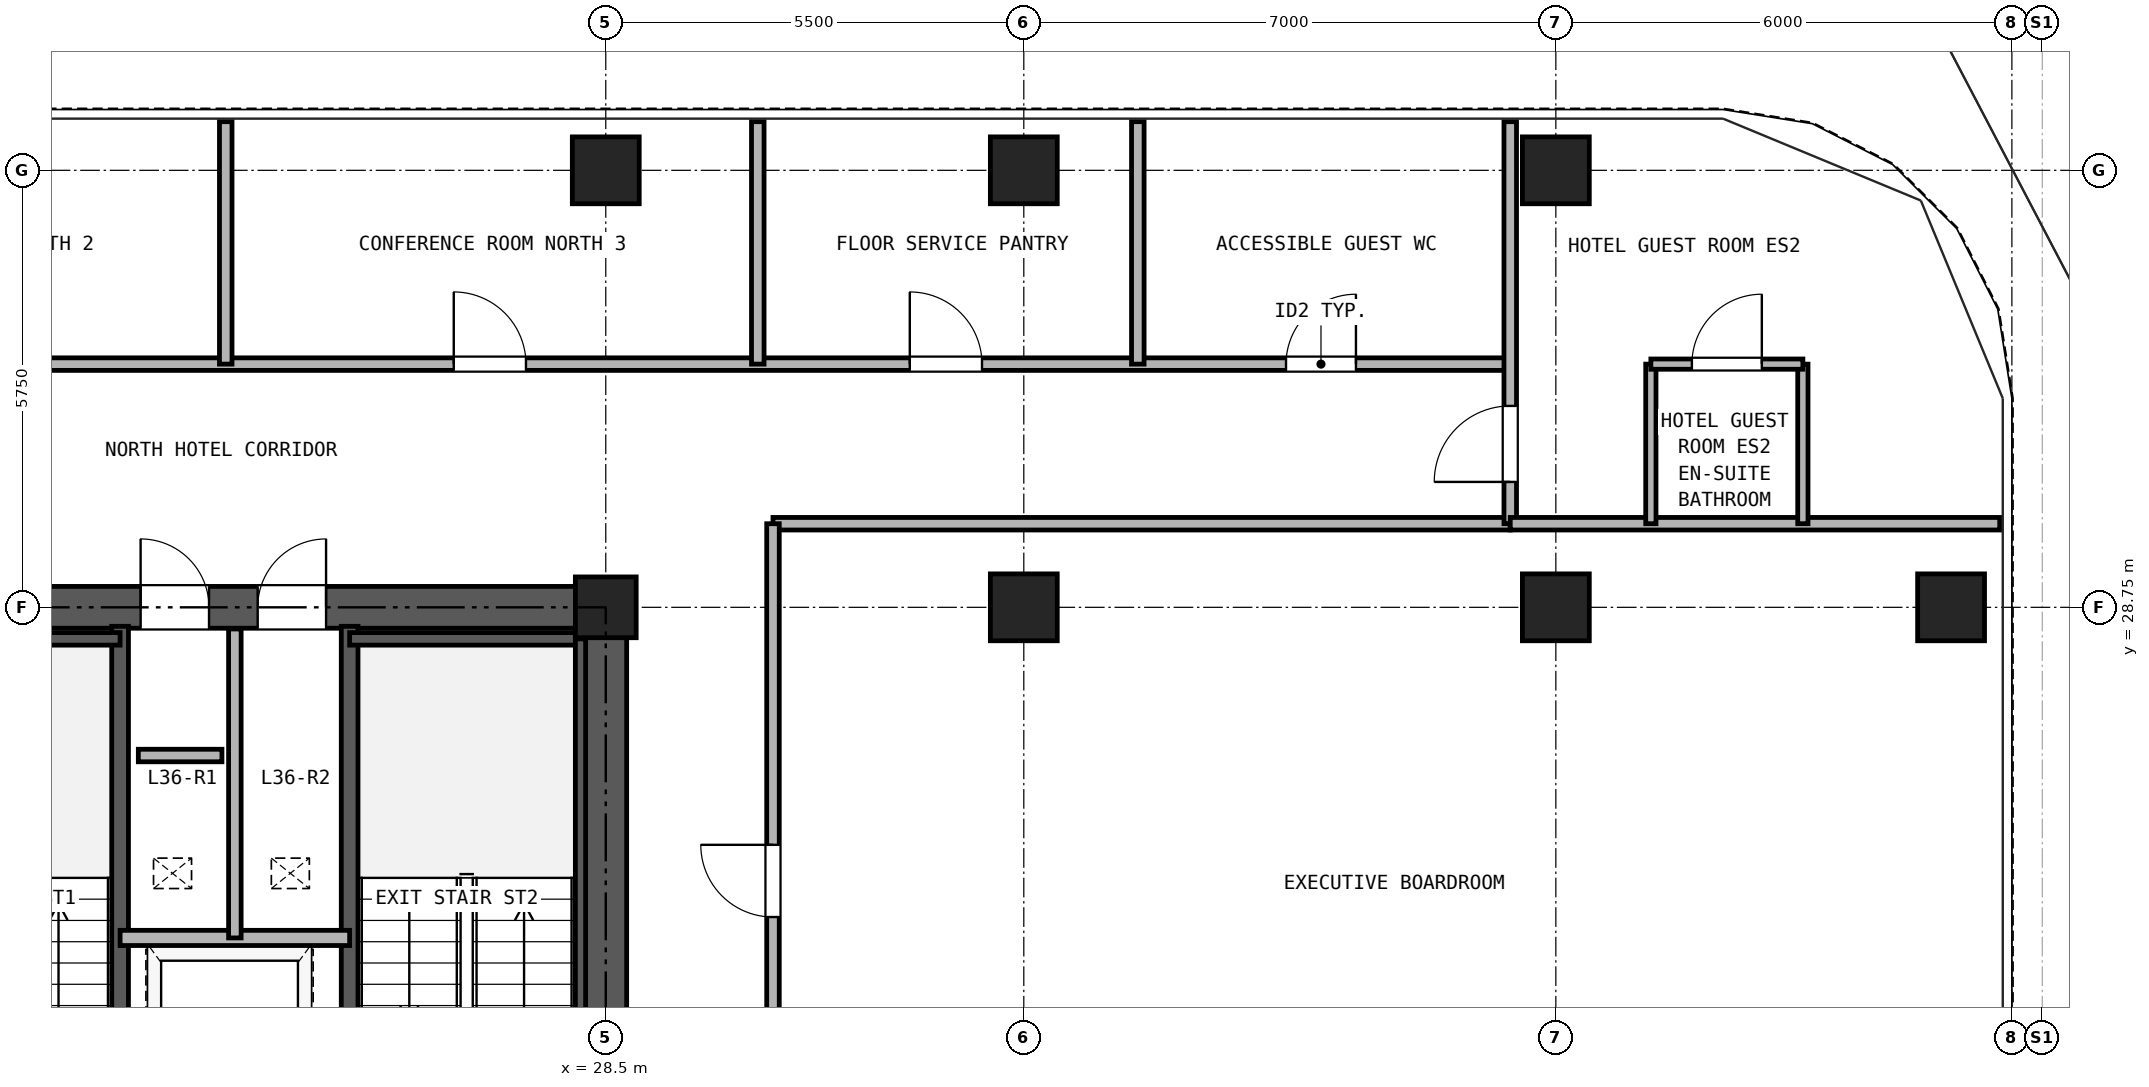
"""IFC4 building model, lengths in metres.
Left out: names, types, materials, properties, quantities, classifications, styles, units other than length and angle.
Written with IfcOpenShell. Run it as: python <this file> out.ifc"""

import sys

from ifc_helpers import new_model, si_unit, direction, frame, frame_2d, origin, origin_2d, place, context, subcontext, project, spatial, rectangle, hollow_rectangle, extrude, source, transform, mapped, element, fill, save


model = new_model("IFC4")
c1 = context("Model", 3, precision=1e-05, world=origin(), true_north=direction((0.0, 1.0)))
c2 = subcontext(c1, "Body", "Model", "MODEL_VIEW")
j1 = project(units=[si_unit("LENGTHUNIT", "METRE"), si_unit("PLANEANGLEUNIT", "RADIAN")], contexts=[c1])
p1 = place(None, origin())
s1 = spatial("IfcSite", under=j1, at=p1, CompositionType="ELEMENT")
p2 = place(p1, origin())
s2 = spatial("IfcBuilding", under=s1, at=p2, CompositionType="ELEMENT")
p3 = place(p2, frame((0.0, 0.0, 131.1)))
s3 = spatial("IfcBuildingStorey", under=s2, at=p3, CompositionType="ELEMENT", Elevation=131.1)
m1 = source(origin(), c2, "Body", "SweptSolid", [
    extrude(hollow_rectangle(XDim=0.88, YDim=0.88, WallThickness=0.05, at=origin_2d()), origin(), (0.0, 0.0, 1.0), 2.95),
])
for number, where, z_axis, x_axis in (
    (1, (28.5, 34.5, 0.0), (0.0, 0.0, 1.0), (1.0, 0.0, 0.0)),
    (2, (34.0, 34.5, 0.0), (0.0, 0.0, 1.0), (1.0, 0.0, 0.0)),
    (3, (41.0, 34.5, 0.0), (0.0, 0.0, 1.0), (1.0, 0.0, 0.0)),
    (4, (46.2, 28.75, 0.0), (0.0, 0.0, 1.0), (1.0, 0.0, 0.0)),
):
    element("IfcColumn", number, at=place(p3, frame(where, z_axis=z_axis, x_axis=x_axis)), inside=s3, PredefinedType="COLUMN", context=c2, shape_type="MappedRepresentation", body=[
        mapped(m1, transform((0.0, 0.0, 0.0), x_axis=(1.0, 0.0, 0.0), y_axis=(0.0, 1.0, 0.0), z_axis=(0.0, 0.0, 1.0), scale=1.0)),
    ])
m2 = source(origin(), c2, "Body", "SweptSolid", [
    extrude(hollow_rectangle(XDim=0.8, YDim=0.8, WallThickness=0.045, at=origin_2d()), origin(), (0.0, 0.0, 1.0), 2.95),
])
p4 = place(p3, frame((28.5, 28.75, 0.0), z_axis=(0.0, 0.0, 1.0), x_axis=(1.0, 0.0, 0.0)))
e5 = element("IfcColumn", 5, at=p4, inside=s3, PredefinedType="COLUMN", context=c2, shape_type="MappedRepresentation", body=[
    mapped(m2, transform((0.0, 0.0, 0.0), x_axis=(1.0, 0.0, 0.0), y_axis=(0.0, 1.0, 0.0), z_axis=(0.0, 0.0, 1.0), scale=1.0)),
])
for number, where, z_axis, x_axis in (
    (6, (34.0, 28.75, 0.0), (0.0, 0.0, 1.0), (1.0, 0.0, 0.0)),
    (7, (41.0, 28.75, 0.0), (0.0, 0.0, 1.0), (1.0, 0.0, 0.0)),
):
    element("IfcColumn", number, at=place(p3, frame(where, z_axis=z_axis, x_axis=x_axis)), inside=s3, PredefinedType="COLUMN", context=c2, shape_type="MappedRepresentation", body=[
        mapped(m1, transform((0.0, 0.0, 0.0), x_axis=(1.0, 0.0, 0.0), y_axis=(0.0, 1.0, 0.0), z_axis=(0.0, 0.0, 1.0), scale=1.0)),
    ])
p5 = place(p3, frame((18.225, 28.75, 0.0), z_axis=(0.0, 0.0, 1.0), x_axis=(1.0, 0.0, 0.0)))
e8 = element("IfcWall", 8, at=p5, inside=s3, PredefinedType="SHEAR", context=c2, shape_type="SweptSolid", body=[
    extrude(rectangle(XDim=10.55, YDim=0.55, at=frame_2d((5.275, 0.0))), origin(), (0.0, 0.0, 1.0), 2.95),
])
p6 = place(p5, frame((4.155, 0.0, 0.0)))
e9 = element("IfcOpeningElement", 9, at=p6, cuts=e8, PredefinedType="OPENING", context=c2, shape_type="SweptSolid", body=[
    extrude(rectangle(XDim=0.9, YDim=2.05, at=frame_2d((0.45, 1.025))), frame((0.0, 0.285, 0.0), z_axis=(0.0, -1.0, 0.0), x_axis=(1.0, 0.0, 0.0)), (0.0, 0.0, 1.0), 0.57),
])
p7 = place(p5, frame((5.695, 0.0, 0.0)))
e10 = element("IfcOpeningElement", 10, at=p7, cuts=e8, PredefinedType="OPENING", context=c2, shape_type="SweptSolid", body=[
    extrude(rectangle(XDim=0.9, YDim=2.05, at=frame_2d((0.45, 1.025))), frame((0.0, 0.285, 0.0), z_axis=(0.0, -1.0, 0.0), x_axis=(1.0, 0.0, 0.0)), (0.0, 0.0, 1.0), 0.57),
])
p8 = place(p3, frame((28.5, 11.775, 0.0), z_axis=(0.0, 0.0, 1.0), x_axis=(0.0, 1.0, 0.0)))
e11 = element("IfcWall", 11, at=p8, inside=s3, PredefinedType="SHEAR", context=c2, shape_type="SweptSolid", body=[
    extrude(rectangle(XDim=16.7, YDim=0.55, at=frame_2d((8.35, 0.0))), origin(), (0.0, 0.0, 1.0), 2.95),
])
p9 = place(p8, frame((7.375, 0.0, 0.0)))
e12 = element("IfcOpeningElement", 12, at=p9, cuts=e11, PredefinedType="OPENING", context=c2, shape_type="SweptSolid", body=[
    extrude(rectangle(XDim=1.15, YDim=2.2, at=frame_2d((0.575, 1.1))), frame((0.0, 0.285, 0.0), z_axis=(0.0, -1.0, 0.0), x_axis=(1.0, 0.0, 0.0)), (0.0, 0.0, 1.0), 0.57),
])
for number, where, z_axis, x_axis in (
    (13, (22.11, 21.39, 0.0), (0.0, 0.0, 1.0), (0.0, 1.0, 0.0)),
    (14, (25.13, 21.39, 0.0), (0.0, 0.0, 1.0), (0.0, 1.0, 0.0)),
):
    element("IfcWall", number, at=place(p3, frame(where, z_axis=z_axis, x_axis=x_axis)), inside=s3, PredefinedType="SOLIDWALL", context=c2, shape_type="SweptSolid", body=[
        extrude(rectangle(XDim=7.11, YDim=0.22, at=frame_2d((3.555, 0.0))), origin(), (0.0, 0.0, 1.0), 2.95),
    ])
p10 = place(p3, frame((18.785, 28.335, 0.0), z_axis=(0.0, 0.0, 1.0), x_axis=(1.0, 0.0, 0.0)))
e15 = element("IfcWall", 15, at=p10, inside=s3, PredefinedType="PARTITIONING", context=c2, shape_type="SweptSolid", body=[
    extrude(rectangle(XDim=3.325, YDim=0.165, at=frame_2d((1.663, 0.0))), origin(), (0.0, 0.0, 1.0), 2.95),
])
p11 = place(p3, frame((25.13, 28.335, 0.0), z_axis=(0.0, 0.0, 1.0), x_axis=(1.0, 0.0, 0.0)))
e16 = element("IfcWall", 16, at=p11, inside=s3, PredefinedType="PARTITIONING", context=c2, shape_type="SweptSolid", body=[
    extrude(rectangle(XDim=3.085, YDim=0.165, at=frame_2d((1.542, 0.0))), origin(), (0.0, 0.0, 1.0), 2.95),
])
p12 = place(p3, frame((28.167, 21.39, 0.0), z_axis=(0.0, 0.0, 1.0), x_axis=(0.0, 1.0, 0.0)))
e17 = element("IfcWall", 17, at=p12, inside=s3, PredefinedType="PARTITIONING", context=c2, shape_type="SweptSolid", body=[
    extrude(rectangle(XDim=6.945, YDim=0.135, at=frame_2d((3.473, 0.0))), origin(), (0.0, 0.0, 1.0), 2.95),
])
p13 = place(p3, frame((22.11, 24.4, 0.0), z_axis=(0.0, 0.0, 1.0), x_axis=(1.0, 0.0, 0.0)))
e18 = element("IfcWall", 18, at=p13, inside=s3, PredefinedType="PARTITIONING", context=c2, shape_type="SweptSolid", body=[
    extrude(rectangle(XDim=3.02, YDim=0.2, at=frame_2d((1.51, 0.0))), origin(), (0.0, 0.0, 1.0), 2.95),
])
p14 = place(p3, frame((23.62, 24.4, 0.0), z_axis=(0.0, 0.0, 1.0), x_axis=(0.0, 1.0, 0.0)))
e19 = element("IfcWall", 19, at=p14, inside=s3, PredefinedType="PARTITIONING", context=c2, shape_type="SweptSolid", body=[
    extrude(rectangle(XDim=4.065, YDim=0.165, at=frame_2d((2.033, 0.0))), origin(), (0.0, 0.0, 1.0), 2.95),
])
p15 = place(p3, frame((6.6, 31.95, 0.0), z_axis=(0.0, 0.0, 1.0), x_axis=(1.0, 0.0, 0.0)))
e20 = element("IfcWall", 20, at=p15, inside=s3, PredefinedType="PARTITIONING", context=c2, shape_type="SweptSolid", body=[
    extrude(rectangle(XDim=33.8, YDim=0.165, at=frame_2d((16.9, 0.0))), origin(), (0.0, 0.0, 1.0), 2.95),
])
p16 = place(p15, frame((4.45, 0.0, 0.0)))
e21 = element("IfcOpeningElement", 21, at=p16, cuts=e20, PredefinedType="OPENING", context=c2, shape_type="SweptSolid", body=[
    extrude(rectangle(XDim=0.95, YDim=2.15, at=frame_2d((0.475, 1.075))), frame((0.0, 0.093, 0.0), z_axis=(0.0, -1.0, 0.0), x_axis=(1.0, 0.0, 0.0)), (0.0, 0.0, 1.0), 0.185),
])
p17 = place(p15, frame((12.9, 0.0, 0.0)))
e22 = element("IfcOpeningElement", 22, at=p17, cuts=e20, PredefinedType="OPENING", context=c2, shape_type="SweptSolid", body=[
    extrude(rectangle(XDim=0.95, YDim=2.15, at=frame_2d((0.475, 1.075))), frame((0.0, 0.093, 0.0), z_axis=(0.0, -1.0, 0.0), x_axis=(1.0, 0.0, 0.0)), (0.0, 0.0, 1.0), 0.185),
])
p18 = place(p15, frame((19.9, 0.0, 0.0)))
e23 = element("IfcOpeningElement", 23, at=p18, cuts=e20, PredefinedType="OPENING", context=c2, shape_type="SweptSolid", body=[
    extrude(rectangle(XDim=0.95, YDim=2.15, at=frame_2d((0.475, 1.075))), frame((0.0, 0.093, 0.0), z_axis=(0.0, -1.0, 0.0), x_axis=(1.0, 0.0, 0.0)), (0.0, 0.0, 1.0), 0.185),
])
p19 = place(p15, frame((25.9, 0.0, 0.0)))
e24 = element("IfcOpeningElement", 24, at=p19, cuts=e20, PredefinedType="OPENING", context=c2, shape_type="SweptSolid", body=[
    extrude(rectangle(XDim=0.95, YDim=2.15, at=frame_2d((0.475, 1.075))), frame((0.0, 0.093, 0.0), z_axis=(0.0, -1.0, 0.0), x_axis=(1.0, 0.0, 0.0)), (0.0, 0.0, 1.0), 0.185),
])
p20 = place(p15, frame((30.85, 0.0, 0.0)))
e25 = element("IfcOpeningElement", 25, at=p20, cuts=e20, PredefinedType="OPENING", context=c2, shape_type="SweptSolid", body=[
    extrude(rectangle(XDim=0.92, YDim=2.1, at=frame_2d((0.46, 1.05))), frame((0.0, 0.093, 0.0), z_axis=(0.0, -1.0, 0.0), x_axis=(1.0, 0.0, 0.0)), (0.0, 0.0, 1.0), 0.185),
])
p21 = place(p3, frame((30.7, 29.85, 0.0), z_axis=(0.0, 0.0, 1.0), x_axis=(1.0, 0.0, 0.0)))
e26 = element("IfcWall", 26, at=p21, inside=s3, PredefinedType="PARTITIONING", context=c2, shape_type="SweptSolid", body=[
    extrude(rectangle(XDim=9.7, YDim=0.165, at=frame_2d((4.85, 0.0))), origin(), (0.0, 0.0, 1.0), 2.95),
])
p22 = place(p3, frame((30.7, 11.15, 0.0), z_axis=(0.0, 0.0, 1.0), x_axis=(0.0, 1.0, 0.0)))
e27 = element("IfcWall", 27, at=p22, inside=s3, PredefinedType="PARTITIONING", context=c2, shape_type="SweptSolid", body=[
    extrude(rectangle(XDim=18.7, YDim=0.165, at=frame_2d((9.35, 0.0))), origin(), (0.0, 0.0, 1.0), 2.95),
])
p23 = place(p22, frame((4.175, 0.0, 0.0)))
e28 = element("IfcOpeningElement", 28, at=p23, cuts=e27, PredefinedType="OPENING", context=c2, shape_type="SweptSolid", body=[
    extrude(rectangle(XDim=0.95, YDim=2.15, at=frame_2d((0.475, 1.075))), frame((0.0, 0.093, 0.0), z_axis=(0.0, -1.0, 0.0), x_axis=(1.0, 0.0, 0.0)), (0.0, 0.0, 1.0), 0.185),
])
p24 = place(p22, frame((13.525, 0.0, 0.0)))
e29 = element("IfcOpeningElement", 29, at=p24, cuts=e27, PredefinedType="OPENING", context=c2, shape_type="SweptSolid", body=[
    extrude(rectangle(XDim=0.95, YDim=2.15, at=frame_2d((0.475, 1.075))), frame((0.0, 0.093, 0.0), z_axis=(0.0, -1.0, 0.0), x_axis=(1.0, 0.0, 0.0)), (0.0, 0.0, 1.0), 0.185),
])
p25 = place(p3, frame((40.4, 29.85, 0.0), z_axis=(0.0, 0.0, 1.0), x_axis=(0.0, 1.0, 0.0)))
e30 = element("IfcWall", 30, at=p25, inside=s3, PredefinedType="PARTITIONING", context=c2, shape_type="SweptSolid", body=[
    extrude(rectangle(XDim=5.29, YDim=0.165, at=frame_2d((2.645, 0.0))), origin(), (0.0, 0.0, 1.0), 2.95),
])
p26 = place(p25, frame((0.55, 0.0, 0.0)))
e31 = element("IfcOpeningElement", 31, at=p26, cuts=e30, PredefinedType="OPENING", context=c2, shape_type="SweptSolid", body=[
    extrude(rectangle(XDim=1.0, YDim=2.15, at=frame_2d((0.5, 1.075))), frame((0.0, 0.093, 0.0), z_axis=(0.0, -1.0, 0.0), x_axis=(1.0, 0.0, 0.0)), (0.0, 0.0, 1.0), 0.185),
])
p27 = place(p3, frame((40.4, 29.85, 0.0), z_axis=(0.0, 0.0, 1.0), x_axis=(1.0, 0.0, 0.0)))
e32 = element("IfcWall", 32, at=p27, inside=s3, PredefinedType="PARTITIONING", context=c2, shape_type="SweptSolid", body=[
    extrude(rectangle(XDim=6.44, YDim=0.165, at=frame_2d((3.22, 0.0))), origin(), (0.0, 0.0, 1.0), 2.95),
])
for number, where, z_axis, x_axis in (
    (33, (42.25, 29.85, 0.0), (0.0, 0.0, 1.0), (0.0, 1.0, 0.0)),
    (34, (44.25, 29.85, 0.0), (0.0, 0.0, 1.0), (0.0, 1.0, 0.0)),
):
    element("IfcWall", number, at=place(p3, frame(where, z_axis=z_axis, x_axis=x_axis)), inside=s3, PredefinedType="PARTITIONING", context=c2, shape_type="SweptSolid", body=[
        extrude(rectangle(XDim=2.1, YDim=0.135, at=frame_2d((1.05, 0.0))), origin(), (0.0, 0.0, 1.0), 2.95),
    ])
p28 = place(p3, frame((42.25, 31.95, 0.0), z_axis=(0.0, 0.0, 1.0), x_axis=(1.0, 0.0, 0.0)))
e35 = element("IfcWall", 35, at=p28, inside=s3, PredefinedType="PARTITIONING", context=c2, shape_type="SweptSolid", body=[
    extrude(rectangle(XDim=2.0, YDim=0.135, at=frame_2d((1.0, 0.0))), origin(), (0.0, 0.0, 1.0), 2.95),
])
p29 = place(p28, frame((0.54, 0.0, 0.0)))
e36 = element("IfcOpeningElement", 36, at=p29, cuts=e35, PredefinedType="OPENING", context=c2, shape_type="SweptSolid", body=[
    extrude(rectangle(XDim=0.92, YDim=2.1, at=frame_2d((0.46, 1.05))), frame((0.0, 0.077, 0.0), z_axis=(0.0, -1.0, 0.0), x_axis=(1.0, 0.0, 0.0)), (0.0, 0.0, 1.0), 0.155),
])
for number, where, z_axis, x_axis in (
    (37, (23.5, 31.95, 0.0), (0.0, 0.0, 1.0), (0.0, 1.0, 0.0)),
    (38, (30.5, 31.95, 0.0), (0.0, 0.0, 1.0), (0.0, 1.0, 0.0)),
    (39, (35.5, 31.95, 0.0), (0.0, 0.0, 1.0), (0.0, 1.0, 0.0)),
):
    element("IfcWall", number, at=place(p3, frame(where, z_axis=z_axis, x_axis=x_axis)), inside=s3, PredefinedType="PARTITIONING", context=c2, shape_type="SweptSolid", body=[
        extrude(rectangle(XDim=3.19, YDim=0.165, at=frame_2d((1.595, 0.0))), origin(), (0.0, 0.0, 1.0), 2.95),
    ])
p30 = place(p3, frame((22.35, 26.8, 0.0), z_axis=(0.0, 0.0, 1.0), x_axis=(1.0, 0.0, 0.0)))
e40 = element("IfcWall", 40, at=p30, inside=s3, PredefinedType="PARTITIONING", context=c2, shape_type="SweptSolid", body=[
    extrude(rectangle(XDim=1.1, YDim=0.165, at=frame_2d((0.55, 0.0))), origin(), (0.0, 0.0, 1.0), 2.95),
])
p31 = place(p6, origin())
e41 = element("IfcDoor", 41, at=p31, inside=s3, OperationType="SINGLE_SWING_LEFT", PredefinedType="DOOR", context=c2, shape_type="SweptSolid", body=[
    extrude(rectangle(XDim=0.9, YDim=2.05, at=frame_2d((0.45, 1.025))), frame((0.0, 0.025, 0.0), z_axis=(0.0, -1.0, 0.0), x_axis=(1.0, 0.0, 0.0)), (0.0, 0.0, 1.0), 0.05),
])
fill(e9, e41)
p32 = place(p7, origin())
e42 = element("IfcDoor", 42, at=p32, inside=s3, OperationType="SINGLE_SWING_RIGHT", PredefinedType="DOOR", context=c2, shape_type="SweptSolid", body=[
    extrude(rectangle(XDim=0.9, YDim=2.05, at=frame_2d((0.45, 1.025))), frame((0.0, 0.025, 0.0), z_axis=(0.0, -1.0, 0.0), x_axis=(1.0, 0.0, 0.0)), (0.0, 0.0, 1.0), 0.05),
])
fill(e10, e42)
p33 = place(p29, frame((0.92, 0.0, 0.0), z_axis=(0.0, 0.0, 1.0), x_axis=(-1.0, 0.0, 0.0)))
e43 = element("IfcDoor", 43, at=p33, inside=s3, OperationType="SINGLE_SWING_RIGHT", PredefinedType="DOOR", context=c2, shape_type="SweptSolid", body=[
    extrude(rectangle(XDim=0.92, YDim=2.1, at=frame_2d((0.46, 1.05))), frame((0.0, 0.025, 0.0), z_axis=(0.0, -1.0, 0.0), x_axis=(1.0, 0.0, 0.0)), (0.0, 0.0, 1.0), 0.05),
])
fill(e36, e43)
p34 = place(p26, frame((1.0, 0.0, 0.0), z_axis=(0.0, 0.0, 1.0), x_axis=(-1.0, 0.0, 0.0)))
e44 = element("IfcDoor", 44, at=p34, inside=s3, OperationType="SINGLE_SWING_LEFT", PredefinedType="DOOR", context=c2, shape_type="SweptSolid", body=[
    extrude(rectangle(XDim=1.0, YDim=2.15, at=frame_2d((0.5, 1.075))), frame((0.0, 0.025, 0.0), z_axis=(0.0, -1.0, 0.0), x_axis=(1.0, 0.0, 0.0)), (0.0, 0.0, 1.0), 0.05),
])
fill(e31, e44)
p35 = place(p18, origin())
e45 = element("IfcDoor", 45, at=p35, inside=s3, OperationType="SINGLE_SWING_LEFT", PredefinedType="DOOR", context=c2, shape_type="SweptSolid", body=[
    extrude(rectangle(XDim=0.95, YDim=2.15, at=frame_2d((0.475, 1.075))), frame((0.0, 0.025, 0.0), z_axis=(0.0, -1.0, 0.0), x_axis=(1.0, 0.0, 0.0)), (0.0, 0.0, 1.0), 0.05),
])
fill(e23, e45)
p36 = place(p19, origin())
e46 = element("IfcDoor", 46, at=p36, inside=s3, OperationType="SINGLE_SWING_LEFT", PredefinedType="DOOR", context=c2, shape_type="SweptSolid", body=[
    extrude(rectangle(XDim=0.95, YDim=2.15, at=frame_2d((0.475, 1.075))), frame((0.0, 0.025, 0.0), z_axis=(0.0, -1.0, 0.0), x_axis=(1.0, 0.0, 0.0)), (0.0, 0.0, 1.0), 0.05),
])
fill(e24, e46)
p37 = place(p20, origin())
e47 = element("IfcDoor", 47, at=p37, inside=s3, OperationType="SINGLE_SWING_RIGHT", PredefinedType="DOOR", context=c2, shape_type="SweptSolid", body=[
    extrude(rectangle(XDim=0.92, YDim=2.1, at=frame_2d((0.46, 1.05))), frame((0.0, 0.025, 0.0), z_axis=(0.0, -1.0, 0.0), x_axis=(1.0, 0.0, 0.0)), (0.0, 0.0, 1.0), 0.05),
])
fill(e25, e47)
p38 = place(p24, origin())
e48 = element("IfcDoor", 48, at=p38, inside=s3, OperationType="SINGLE_SWING_RIGHT", PredefinedType="DOOR", context=c2, shape_type="SweptSolid", body=[
    extrude(rectangle(XDim=0.95, YDim=2.15, at=frame_2d((0.475, 1.075))), frame((0.0, 0.025, 0.0), z_axis=(0.0, -1.0, 0.0), x_axis=(1.0, 0.0, 0.0)), (0.0, 0.0, 1.0), 0.05),
])
fill(e29, e48)
save(model, sys.argv[1])
